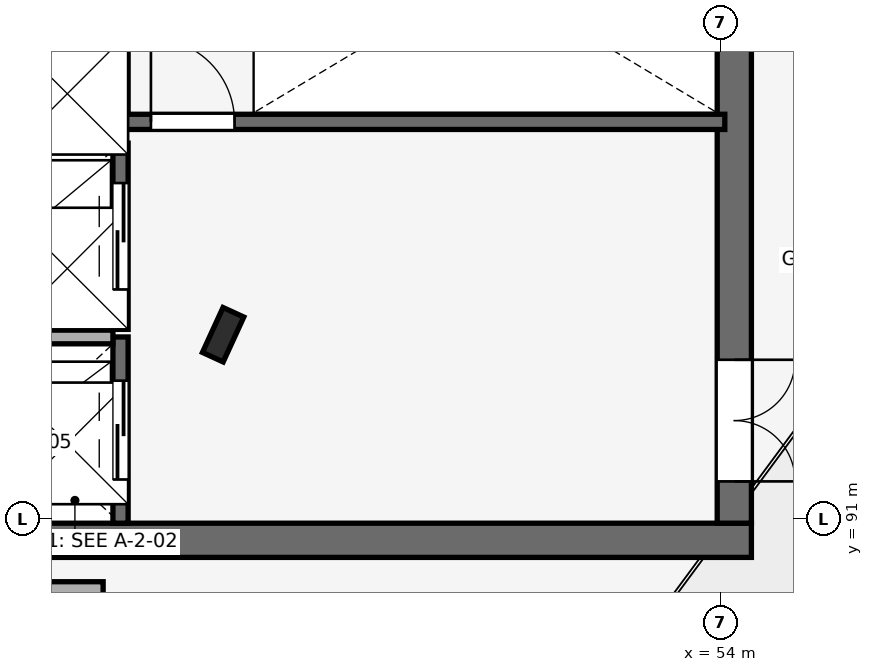
"""IFC4 building model, lengths in metres.
Left out: names, types, materials, properties, quantities, classifications, styles, units other than length and angle.
Written with IfcOpenShell. Run it as: python <this file> out.ifc"""

import sys

from ifc_helpers import new_model, si_unit, direction, frame, frame_2d, origin, origin_2d, place, context, subcontext, project, spatial, rectangle, i_section, extrude, element, fill, save


model = new_model("IFC4")
c1 = context("Model", 3, precision=1e-05, world=origin(), true_north=direction((0.0, 1.0)))
c2 = subcontext(c1, "Body", "Model", "MODEL_VIEW")
j1 = project(units=[si_unit("LENGTHUNIT", "METRE"), si_unit("PLANEANGLEUNIT", "RADIAN")], contexts=[c1])
p1 = place(None, origin())
s1 = spatial("IfcSite", under=j1, at=p1, CompositionType="ELEMENT")
p2 = place(p1, origin())
s2 = spatial("IfcBuilding", under=s1, at=p2, CompositionType="ELEMENT")
p3 = place(p2, frame((0.0, 0.0, 24.0)))
s3 = spatial("IfcBuildingStorey", under=s2, at=p3, CompositionType="ELEMENT", Elevation=24.0)
p4 = place(p3, frame((47.45, 93.43, 0.0), z_axis=(0.0, 0.0, 1.0), x_axis=(-0.909018020308, 0.416756810089, 0.0)))
e1 = element("IfcColumn", 1, at=p4, inside=s3, PredefinedType="COLUMN", context=c2, shape_type="SweptSolid", body=[
    extrude(i_section(OverallWidth=0.3, OverallDepth=0.65, WebThickness=0.016, FlangeThickness=0.031, FilletRadius=0.027, at=origin_2d()), origin(), (0.0, 0.0, 1.0), 3.4),
])
p5 = place(p3, frame((43.0, 90.725, 0.0), z_axis=(0.0, 0.0, 1.0), x_axis=(1.0, 0.0, 0.0)))
e2 = element("IfcWall", 2, at=p5, inside=s3, PredefinedType="SHEAR", context=c2, shape_type="SweptSolid", body=[
    extrude(rectangle(XDim=11.4, YDim=0.45, at=frame_2d((5.7, 0.0))), origin(), (0.0, 0.0, 1.0), 4.8),
])
p6 = place(p3, frame((54.175, 90.95, 0.0), z_axis=(0.0, 0.0, 1.0), x_axis=(0.0, 1.0, 0.0)))
e3 = element("IfcWall", 3, at=p6, inside=s3, PredefinedType="SHEAR", context=c2, shape_type="SweptSolid", body=[
    extrude(rectangle(XDim=9.1, YDim=0.45, at=frame_2d((4.55, 0.0))), origin(), (0.0, 0.0, 1.0), 4.8),
])
p7 = place(p6, frame((0.55, 0.0, 0.0)))
e4 = element("IfcOpeningElement", 4, at=p7, cuts=e3, PredefinedType="OPENING", context=c2, shape_type="SweptSolid", body=[
    extrude(rectangle(XDim=1.6, YDim=2.2, at=frame_2d((0.8, 1.1))), frame((0.0, 0.235, 0.0), z_axis=(0.0, -1.0, 0.0), x_axis=(1.0, 0.0, 0.0)), (0.0, 0.0, 1.0), 0.47),
])
p8 = place(p3, frame((44.585, 87.206, 0.0), z_axis=(0.0, 0.0, 1.0), x_axis=(0.418086422493, 0.908407256316, 0.0)))
e5 = element("IfcWall", 5, at=p8, inside=s3, PredefinedType="STANDARD", context=c2, shape_type="SweptSolid", body=[
    extrude(rectangle(XDim=3.076, YDim=0.36, at=frame_2d((1.538, 0.0))), origin(), (0.0, 0.0, 1.0), 3.38),
])
p9 = place(p3, frame((45.871, 90.0, 0.0), z_axis=(0.0, 0.0, 1.0), x_axis=(-1.0, 0.0, 0.0)))
e6 = element("IfcWall", 6, at=p9, inside=s3, PredefinedType="STANDARD", context=c2, shape_type="SweptSolid", body=[
    extrude(rectangle(XDim=3.371, YDim=0.36, at=frame_2d((1.686, 0.0))), origin(), (0.0, 0.0, 1.0), 3.38),
])
p10 = place(p3, frame((46.1, 90.95, 0.0), z_axis=(0.0, 0.0, 1.0), x_axis=(0.0, 1.0, 0.0)))
e7 = element("IfcWall", 7, at=p10, inside=s3, PredefinedType="SHEAR", context=c2, shape_type="SweptSolid", body=[
    extrude(rectangle(XDim=2.45, YDim=0.2, at=frame_2d((1.225, 0.0))), origin(), (0.0, 0.0, 1.0), 3.38),
])
p11 = place(p10, frame((0.575, 0.0, 0.0)))
e8 = element("IfcOpeningElement", 8, at=p11, cuts=e7, PredefinedType="OPENING", context=c2, shape_type="SweptSolid", body=[
    extrude(rectangle(XDim=1.3, YDim=2.2, at=frame_2d((0.65, 1.1))), frame((0.0, 0.11, 0.0), z_axis=(0.0, -1.0, 0.0), x_axis=(1.0, 0.0, 0.0)), (0.0, 0.0, 1.0), 0.22),
])
p12 = place(p3, frame((43.55, 93.4, 0.0), z_axis=(0.0, 0.0, 1.0), x_axis=(1.0, 0.0, 0.0)))
e9 = element("IfcWall", 9, at=p12, inside=s3, PredefinedType="PARTITIONING", context=c2, shape_type="SweptSolid", body=[
    extrude(rectangle(XDim=2.45, YDim=0.18, at=frame_2d((1.225, 0.0))), origin(), (0.0, 0.0, 1.0), 4.8),
])
p13 = place(p3, frame((46.1, 93.5, 0.0), z_axis=(0.0, 0.0, 1.0), x_axis=(0.0, 1.0, 0.0)))
e10 = element("IfcWall", 10, at=p13, inside=s3, PredefinedType="SHEAR", context=c2, shape_type="SweptSolid", body=[
    extrude(rectangle(XDim=2.45, YDim=0.2, at=frame_2d((1.225, 0.0))), origin(), (0.0, 0.0, 1.0), 3.38),
])
p14 = place(p13, frame((0.525, 0.0, 0.0)))
e11 = element("IfcOpeningElement", 11, at=p14, cuts=e10, PredefinedType="OPENING", context=c2, shape_type="SweptSolid", body=[
    extrude(rectangle(XDim=1.4, YDim=2.2, at=frame_2d((0.7, 1.1))), frame((0.0, 0.11, 0.0), z_axis=(0.0, -1.0, 0.0), x_axis=(1.0, 0.0, 0.0)), (0.0, 0.0, 1.0), 0.22),
])
p15 = place(p3, frame((43.55, 95.95, 0.0), z_axis=(0.0, 0.0, 1.0), x_axis=(1.0, 0.0, 0.0)))
e12 = element("IfcWall", 12, at=p15, inside=s3, PredefinedType="PARTITIONING", context=c2, shape_type="SweptSolid", body=[
    extrude(rectangle(XDim=2.45, YDim=0.18, at=frame_2d((1.225, 0.0))), origin(), (0.0, 0.0, 1.0), 4.8),
])
p16 = place(p3, frame((46.1, 96.23, 0.0), z_axis=(0.0, 0.0, 1.0), x_axis=(1.0, 0.0, 0.0)))
e13 = element("IfcWall", 13, at=p16, inside=s3, PredefinedType="SHEAR", context=c2, shape_type="SweptSolid", body=[
    extrude(rectangle(XDim=7.95, YDim=0.2, at=frame_2d((3.975, 0.0))), origin(), (0.0, 0.0, 1.0), 4.8),
])
p17 = place(p16, frame((0.4, 0.0, 0.0)))
e14 = element("IfcOpeningElement", 14, at=p17, cuts=e13, PredefinedType="OPENING", context=c2, shape_type="SweptSolid", body=[
    extrude(rectangle(XDim=1.1, YDim=2.15, at=frame_2d((0.55, 1.075))), frame((0.0, 0.11, 0.0), z_axis=(0.0, -1.0, 0.0), x_axis=(1.0, 0.0, 0.0)), (0.0, 0.0, 1.0), 0.22),
])
p18 = place(p3, frame((46.1, 96.332, 0.0), z_axis=(0.0, 0.0, 1.0), x_axis=(0.0, 1.0, 0.0)))
e15 = element("IfcWall", 15, at=p18, inside=s3, PredefinedType="SHEAR", context=c2, shape_type="SweptSolid", body=[
    extrude(rectangle(XDim=3.686, YDim=0.2, at=frame_2d((1.843, 0.0))), origin(), (0.0, 0.0, 1.0), 4.8),
])
p19 = place(p2, frame((0.0, 0.0, 28.8)))
p20 = place(p19, frame((45.198, 94.453, 0.0)))
p21 = place(p20, frame((0.202, -2.453, -0.01)))
p22 = place(p21, frame((0.0, 0.0, 0.14)))
e16 = element("IfcWindow", 16, at=p22, inside=s3, PartitioningType="SINGLE_PANEL", PredefinedType="SKYLIGHT", context=c2, shape_type="SweptSolid", body=[
    extrude(rectangle(XDim=1.6, YDim=1.6, at=origin_2d()), origin(), (0.0, 0.0, 1.0), 0.05),
])
p23 = place(p20, frame((0.202, -0.153, -0.01)))
p24 = place(p23, frame((0.0, 0.0, 0.14)))
e17 = element("IfcWindow", 17, at=p24, inside=s3, PartitioningType="SINGLE_PANEL", PredefinedType="SKYLIGHT", context=c2, shape_type="SweptSolid", body=[
    extrude(rectangle(XDim=1.6, YDim=1.6, at=origin_2d()), origin(), (0.0, 0.0, 1.0), 0.05),
])
p25 = place(p20, frame((0.202, 2.147, -0.01)))
p26 = place(p25, frame((0.0, 0.0, 0.14)))
e18 = element("IfcWindow", 18, at=p26, inside=s3, PartitioningType="SINGLE_PANEL", PredefinedType="SKYLIGHT", context=c2, shape_type="SweptSolid", body=[
    extrude(rectangle(XDim=1.6, YDim=1.6, at=origin_2d()), origin(), (0.0, 0.0, 1.0), 0.05),
])
p27 = place(p11, origin())
e19 = element("IfcDoor", 19, at=p27, inside=s3, OperationType="DOUBLE_DOOR_SLIDING", PredefinedType="DOOR", context=c2, shape_type="SweptSolid", body=[
    extrude(rectangle(XDim=1.3, YDim=2.2, at=frame_2d((0.65, 1.1))), frame((0.0, 0.025, 0.0), z_axis=(0.0, -1.0, 0.0), x_axis=(1.0, 0.0, 0.0)), (0.0, 0.0, 1.0), 0.05),
])
fill(e8, e19)
p28 = place(p14, origin())
e20 = element("IfcDoor", 20, at=p28, inside=s3, OperationType="DOUBLE_DOOR_SLIDING", PredefinedType="DOOR", context=c2, shape_type="SweptSolid", body=[
    extrude(rectangle(XDim=1.4, YDim=2.2, at=frame_2d((0.7, 1.1))), frame((0.0, 0.025, 0.0), z_axis=(0.0, -1.0, 0.0), x_axis=(1.0, 0.0, 0.0)), (0.0, 0.0, 1.0), 0.05),
])
fill(e11, e20)
p29 = place(p17, frame((1.1, 0.0, 0.0), z_axis=(0.0, 0.0, 1.0), x_axis=(-1.0, 0.0, 0.0)))
e21 = element("IfcDoor", 21, at=p29, inside=s3, OperationType="SINGLE_SWING_RIGHT", PredefinedType="DOOR", context=c2, shape_type="SweptSolid", body=[
    extrude(rectangle(XDim=1.1, YDim=2.15, at=frame_2d((0.55, 1.075))), frame((0.0, 0.025, 0.0), z_axis=(0.0, -1.0, 0.0), x_axis=(1.0, 0.0, 0.0)), (0.0, 0.0, 1.0), 0.05),
])
fill(e14, e21)
p30 = place(p7, frame((1.6, 0.0, 0.0), z_axis=(0.0, 0.0, 1.0), x_axis=(-1.0, 0.0, 0.0)))
e22 = element("IfcDoor", 22, at=p30, inside=s3, OperationType="DOUBLE_DOOR_SINGLE_SWING", PredefinedType="DOOR", context=c2, shape_type="SweptSolid", body=[
    extrude(rectangle(XDim=1.6, YDim=2.2, at=frame_2d((0.8, 1.1))), frame((0.0, 0.025, 0.0), z_axis=(0.0, -1.0, 0.0), x_axis=(1.0, 0.0, 0.0)), (0.0, 0.0, 1.0), 0.05),
])
fill(e4, e22)
save(model, sys.argv[1])
